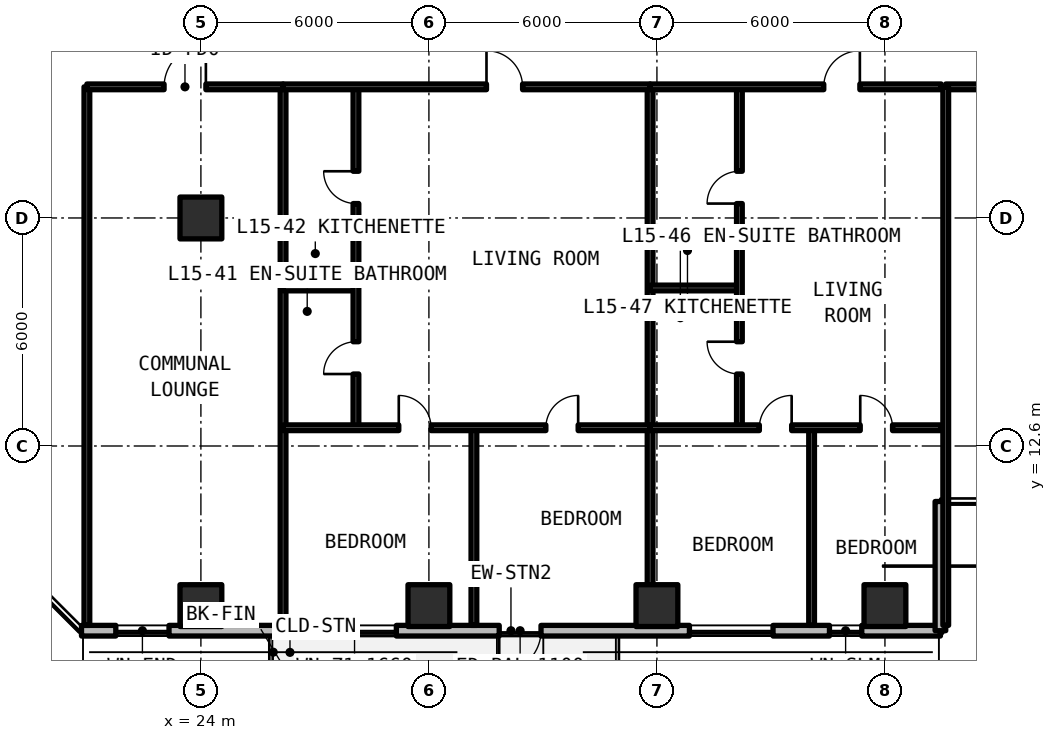
"""IFC4 building model, lengths in metres.
Left out: names, types, materials, properties, quantities, classifications, styles, units other than length and angle.
Written with IfcOpenShell. Run it as: python <this file> out.ifc"""

import sys

from ifc_helpers import new_model, si_unit, direction, frame, frame_2d, origin, origin_2d, place, context, subcontext, project, spatial, rectangle, extrude, element, fill, save


model = new_model("IFC4")
c1 = context("Model", 3, precision=1e-05, world=origin(), true_north=direction((0.0, 1.0)))
c2 = subcontext(c1, "Body", "Model", "MODEL_VIEW")
j1 = project(units=[si_unit("LENGTHUNIT", "METRE"), si_unit("PLANEANGLEUNIT", "RADIAN")], contexts=[c1])
p1 = place(None, origin())
s1 = spatial("IfcSite", under=j1, at=p1, CompositionType="ELEMENT")
p2 = place(p1, origin())
s2 = spatial("IfcBuilding", under=s1, at=p2, CompositionType="ELEMENT")
p3 = place(p2, frame((0.0, 0.0, 55.44)))
s3 = spatial("IfcBuildingStorey", under=s2, at=p3, CompositionType="ELEMENT", Elevation=55.44)
for number, where, z_axis, x_axis in (
    (1, (24.0, 18.6, 0.0), (0.0, 0.0, 1.0), (1.0, 0.0, 0.0)),
    (2, (24.0, 8.4, 0.0), (0.0, 0.0, 1.0), (1.0, 0.0, 0.0)),
    (3, (30.0, 8.4, 0.0), (0.0, 0.0, 1.0), (1.0, 0.0, 0.0)),
    (4, (36.0, 8.4, 0.0), (0.0, 0.0, 1.0), (1.0, 0.0, 0.0)),
    (5, (42.0, 8.4, 0.0), (0.0, 0.0, 1.0), (1.0, 0.0, 0.0)),
):
    element("IfcColumn", number, at=place(p3, frame(where, z_axis=z_axis, x_axis=x_axis)), inside=s3, PredefinedType="COLUMN", context=c2, shape_type="SweptSolid", body=[
        extrude(rectangle(XDim=1.1, YDim=1.1, at=origin_2d()), origin(), (0.0, 0.0, 1.0), 3.3),
    ])
p4 = place(p3, frame((20.858, 7.74, 0.0), z_axis=(0.0, 0.0, 1.0), x_axis=(1.0, 0.0, 0.0)))
e6 = element("IfcWall", 6, at=p4, inside=s3, PredefinedType="SOLIDWALL", context=c2, shape_type="SweptSolid", body=[
    extrude(rectangle(XDim=22.602, YDim=0.28, at=frame_2d((11.301, 0.0))), origin(), (0.0, 0.0, 1.0), 3.08),
])
p5 = place(p4, frame((10.992, 0.0, 0.0)))
e7 = element("IfcOpeningElement", 7, at=p5, cuts=e6, PredefinedType="OPENING", context=c2, shape_type="SweptSolid", body=[
    extrude(rectangle(XDim=1.1, YDim=2.15, at=frame_2d((0.55, 1.075))), frame((0.0, 0.15, 0.0), z_axis=(0.0, -1.0, 0.0), x_axis=(1.0, 0.0, 0.0)), (0.0, 0.0, 1.0), 0.3),
])
p6 = place(p4, frame((0.903, 0.0, 0.78)))
e8 = element("IfcOpeningElement", 8, at=p6, cuts=e6, PredefinedType="OPENING", context=c2, shape_type="SweptSolid", body=[
    extrude(rectangle(XDim=1.4, YDim=1.65, at=frame_2d((0.7, 0.825))), frame((0.0, 0.15, 0.0), z_axis=(0.0, -1.0, 0.0), x_axis=(1.0, 0.0, 0.0)), (0.0, 0.0, 1.0), 0.3),
])
p7 = place(p4, frame((6.085, 0.0, 0.78)))
e9 = element("IfcOpeningElement", 9, at=p7, cuts=e6, PredefinedType="OPENING", context=c2, shape_type="SweptSolid", body=[
    extrude(rectangle(XDim=2.2, YDim=1.66, at=frame_2d((1.1, 0.83))), frame((0.0, 0.15, 0.0), z_axis=(0.0, -1.0, 0.0), x_axis=(1.0, 0.0, 0.0)), (0.0, 0.0, 1.0), 0.3),
])
p8 = place(p4, frame((15.997, 0.0, 0.78)))
e10 = element("IfcOpeningElement", 10, at=p8, cuts=e6, PredefinedType="OPENING", context=c2, shape_type="SweptSolid", body=[
    extrude(rectangle(XDim=2.2, YDim=1.66, at=frame_2d((1.1, 0.83))), frame((0.0, 0.15, 0.0), z_axis=(0.0, -1.0, 0.0), x_axis=(1.0, 0.0, 0.0)), (0.0, 0.0, 1.0), 0.3),
])
p9 = place(p4, frame((19.682, 0.0, 0.78)))
e11 = element("IfcOpeningElement", 11, at=p9, cuts=e6, PredefinedType="OPENING", context=c2, shape_type="SweptSolid", body=[
    extrude(rectangle(XDim=0.85, YDim=1.65, at=frame_2d((0.425, 0.825))), frame((0.0, 0.15, 0.0), z_axis=(0.0, -1.0, 0.0), x_axis=(1.0, 0.0, 0.0)), (0.0, 0.0, 1.0), 0.3),
])
p10 = place(p3, frame((43.46, 7.74, 0.0), z_axis=(0.0, 0.0, 1.0), x_axis=(0.0, 1.0, 0.0)))
e12 = element("IfcWall", 12, at=p10, inside=s3, PredefinedType="SOLIDWALL", context=c2, shape_type="SweptSolid", body=[
    extrude(rectangle(XDim=3.4, YDim=0.28, at=frame_2d((1.7, 0.0))), origin(), (0.0, 0.0, 1.0), 3.08),
])
p11 = place(p3, frame((43.6, 22.05, 0.0), z_axis=(0.0, 0.0, 1.0), x_axis=(1.0, 0.0, 0.0)))
e13 = element("IfcWall", 13, at=p11, inside=s3, PredefinedType="SOLIDWALL", context=c2, shape_type="SweptSolid", body=[
    extrude(rectangle(XDim=8.4, YDim=0.15, at=frame_2d((4.2, 0.0))), origin(), (0.0, 0.0, 1.0), 2.35),
])
p12 = place(p11, frame((3.65, 0.0, 0.0)))
e14 = element("IfcOpeningElement", 14, at=p12, cuts=e13, PredefinedType="OPENING", context=c2, shape_type="SweptSolid", body=[
    extrude(rectangle(XDim=1.1, YDim=2.15, at=frame_2d((0.55, 1.075))), frame((0.0, 0.085, 0.0), z_axis=(0.0, -1.0, 0.0), x_axis=(1.0, 0.0, 0.0)), (0.0, 0.0, 1.0), 0.17),
])
for number, where, z_axis, x_axis in (
    (15, (43.6, 7.88, 0.0), (0.0, 0.0, 1.0), (0.0, 1.0, 0.0)),
    (16, (21.0, 7.88, 0.0), (0.0, 0.0, 1.0), (0.0, 1.0, 0.0)),
    (17, (26.162, 7.88, 0.0), (0.0, 0.0, 1.0), (0.0, 1.0, 0.0)),
):
    element("IfcWall", number, at=place(p3, frame(where, z_axis=z_axis, x_axis=x_axis)), inside=s3, PredefinedType="SOLIDWALL", context=c2, shape_type="SweptSolid", body=[
        extrude(rectangle(XDim=14.17, YDim=0.15, at=frame_2d((7.085, 0.0))), origin(), (0.0, 0.0, 1.0), 2.35),
    ])
p13 = place(p3, frame((21.0, 22.05, 0.0), z_axis=(0.0, 0.0, 1.0), x_axis=(1.0, 0.0, 0.0)))
e18 = element("IfcWall", 18, at=p13, inside=s3, PredefinedType="SOLIDWALL", context=c2, shape_type="SweptSolid", body=[
    extrude(rectangle(XDim=5.162, YDim=0.15, at=frame_2d((2.581, 0.0))), origin(), (0.0, 0.0, 1.0), 2.35),
])
p14 = place(p13, frame((2.031, 0.0, 0.0)))
e19 = element("IfcOpeningElement", 19, at=p14, cuts=e18, PredefinedType="OPENING", context=c2, shape_type="SweptSolid", body=[
    extrude(rectangle(XDim=1.1, YDim=2.15, at=frame_2d((0.55, 1.075))), frame((0.0, 0.085, 0.0), z_axis=(0.0, -1.0, 0.0), x_axis=(1.0, 0.0, 0.0)), (0.0, 0.0, 1.0), 0.17),
])
p15 = place(p3, frame((35.82, 7.88, 0.0), z_axis=(0.0, 0.0, 1.0), x_axis=(0.0, 1.0, 0.0)))
e20 = element("IfcWall", 20, at=p15, inside=s3, PredefinedType="SOLIDWALL", context=c2, shape_type="SweptSolid", body=[
    extrude(rectangle(XDim=14.17, YDim=0.15, at=frame_2d((7.085, 0.0))), origin(), (0.0, 0.0, 1.0), 2.35),
])
p16 = place(p3, frame((26.162, 16.758, 0.0), z_axis=(0.0, 0.0, 1.0), x_axis=(1.0, 0.0, 0.0)))
e21 = element("IfcWall", 21, at=p16, inside=s3, PredefinedType="PARTITIONING", context=c2, shape_type="SweptSolid", body=[
    extrude(rectangle(XDim=1.918, YDim=0.15, at=frame_2d((0.959, 0.0))), origin(), (0.0, 0.0, 1.0), 2.35),
])
p17 = place(p3, frame((28.08, 13.08, 0.0), z_axis=(0.0, 0.0, 1.0), x_axis=(0.0, 1.0, 0.0)))
e22 = element("IfcWall", 22, at=p17, inside=s3, PredefinedType="PARTITIONING", context=c2, shape_type="SweptSolid", body=[
    extrude(rectangle(XDim=8.97, YDim=0.15, at=frame_2d((4.485, 0.0))), origin(), (0.0, 0.0, 1.0), 2.35),
])
p18 = place(p17, frame((1.414, 0.0, 0.0)))
e23 = element("IfcOpeningElement", 23, at=p18, cuts=e22, PredefinedType="OPENING", context=c2, shape_type="SweptSolid", body=[
    extrude(rectangle(XDim=0.85, YDim=2.1, at=frame_2d((0.425, 1.05))), frame((0.0, 0.085, 0.0), z_axis=(0.0, -1.0, 0.0), x_axis=(1.0, 0.0, 0.0)), (0.0, 0.0, 1.0), 0.17),
])
p19 = place(p17, frame((5.899, 0.0, 0.0)))
e24 = element("IfcOpeningElement", 24, at=p19, cuts=e22, PredefinedType="OPENING", context=c2, shape_type="SweptSolid", body=[
    extrude(rectangle(XDim=0.85, YDim=2.1, at=frame_2d((0.425, 1.05))), frame((0.0, 0.085, 0.0), z_axis=(0.0, -1.0, 0.0), x_axis=(1.0, 0.0, 0.0)), (0.0, 0.0, 1.0), 0.17),
])
p20 = place(p3, frame((31.184, 7.88, 0.0), z_axis=(0.0, 0.0, 1.0), x_axis=(0.0, 1.0, 0.0)))
e25 = element("IfcWall", 25, at=p20, inside=s3, PredefinedType="PARTITIONING", context=c2, shape_type="SweptSolid", body=[
    extrude(rectangle(XDim=5.2, YDim=0.15, at=frame_2d((2.6, 0.0))), origin(), (0.0, 0.0, 1.0), 2.35),
])
p21 = place(p3, frame((26.162, 13.08, 0.0), z_axis=(0.0, 0.0, 1.0), x_axis=(1.0, 0.0, 0.0)))
e26 = element("IfcWall", 26, at=p21, inside=s3, PredefinedType="PARTITIONING", context=c2, shape_type="SweptSolid", body=[
    extrude(rectangle(XDim=9.658, YDim=0.15, at=frame_2d((4.829, 0.0))), origin(), (0.0, 0.0, 1.0), 2.35),
])
p22 = place(p21, frame((3.045, 0.0, 0.0)))
e27 = element("IfcOpeningElement", 27, at=p22, cuts=e26, PredefinedType="OPENING", context=c2, shape_type="SweptSolid", body=[
    extrude(rectangle(XDim=0.85, YDim=2.1, at=frame_2d((0.425, 1.05))), frame((0.0, 0.085, 0.0), z_axis=(0.0, -1.0, 0.0), x_axis=(1.0, 0.0, 0.0)), (0.0, 0.0, 1.0), 0.17),
])
p23 = place(p21, frame((6.915, 0.0, 0.0)))
e28 = element("IfcOpeningElement", 28, at=p23, cuts=e26, PredefinedType="OPENING", context=c2, shape_type="SweptSolid", body=[
    extrude(rectangle(XDim=0.85, YDim=2.1, at=frame_2d((0.425, 1.05))), frame((0.0, 0.085, 0.0), z_axis=(0.0, -1.0, 0.0), x_axis=(1.0, 0.0, 0.0)), (0.0, 0.0, 1.0), 0.17),
])
p24 = place(p3, frame((26.162, 22.05, 0.0), z_axis=(0.0, 0.0, 1.0), x_axis=(1.0, 0.0, 0.0)))
e29 = element("IfcWall", 29, at=p24, inside=s3, PredefinedType="SOLIDWALL", context=c2, shape_type="SweptSolid", body=[
    extrude(rectangle(XDim=9.658, YDim=0.15, at=frame_2d((4.829, 0.0))), origin(), (0.0, 0.0, 1.0), 2.35),
])
p25 = place(p24, frame((5.353, 0.0, 0.0)))
e30 = element("IfcOpeningElement", 30, at=p25, cuts=e29, PredefinedType="OPENING", context=c2, shape_type="SweptSolid", body=[
    extrude(rectangle(XDim=0.95, YDim=2.15, at=frame_2d((0.475, 1.075))), frame((0.0, 0.085, 0.0), z_axis=(0.0, -1.0, 0.0), x_axis=(1.0, 0.0, 0.0)), (0.0, 0.0, 1.0), 0.17),
])
p26 = place(p3, frame((35.82, 16.758, 0.0), z_axis=(0.0, 0.0, 1.0), x_axis=(1.0, 0.0, 0.0)))
e31 = element("IfcWall", 31, at=p26, inside=s3, PredefinedType="PARTITIONING", context=c2, shape_type="SweptSolid", body=[
    extrude(rectangle(XDim=2.35, YDim=0.15, at=frame_2d((1.175, 0.0))), origin(), (0.0, 0.0, 1.0), 2.35),
])
p27 = place(p3, frame((38.17, 13.08, 0.0), z_axis=(0.0, 0.0, 1.0), x_axis=(0.0, 1.0, 0.0)))
e32 = element("IfcWall", 32, at=p27, inside=s3, PredefinedType="PARTITIONING", context=c2, shape_type="SweptSolid", body=[
    extrude(rectangle(XDim=8.97, YDim=0.15, at=frame_2d((4.485, 0.0))), origin(), (0.0, 0.0, 1.0), 2.35),
])
p28 = place(p27, frame((1.414, 0.0, 0.0)))
e33 = element("IfcOpeningElement", 33, at=p28, cuts=e32, PredefinedType="OPENING", context=c2, shape_type="SweptSolid", body=[
    extrude(rectangle(XDim=0.85, YDim=2.1, at=frame_2d((0.425, 1.05))), frame((0.0, 0.085, 0.0), z_axis=(0.0, -1.0, 0.0), x_axis=(1.0, 0.0, 0.0)), (0.0, 0.0, 1.0), 0.17),
])
p29 = place(p27, frame((5.899, 0.0, 0.0)))
e34 = element("IfcOpeningElement", 34, at=p29, cuts=e32, PredefinedType="OPENING", context=c2, shape_type="SweptSolid", body=[
    extrude(rectangle(XDim=0.85, YDim=2.1, at=frame_2d((0.425, 1.05))), frame((0.0, 0.085, 0.0), z_axis=(0.0, -1.0, 0.0), x_axis=(1.0, 0.0, 0.0)), (0.0, 0.0, 1.0), 0.17),
])
p30 = place(p3, frame((40.07, 7.88, 0.0), z_axis=(0.0, 0.0, 1.0), x_axis=(0.0, 1.0, 0.0)))
e35 = element("IfcWall", 35, at=p30, inside=s3, PredefinedType="PARTITIONING", context=c2, shape_type="SweptSolid", body=[
    extrude(rectangle(XDim=5.2, YDim=0.15, at=frame_2d((2.6, 0.0))), origin(), (0.0, 0.0, 1.0), 2.35),
])
p31 = place(p3, frame((35.82, 13.08, 0.0), z_axis=(0.0, 0.0, 1.0), x_axis=(1.0, 0.0, 0.0)))
e36 = element("IfcWall", 36, at=p31, inside=s3, PredefinedType="PARTITIONING", context=c2, shape_type="SweptSolid", body=[
    extrude(rectangle(XDim=7.66, YDim=0.15, at=frame_2d((3.83, 0.0))), origin(), (0.0, 0.0, 1.0), 2.35),
])
p32 = place(p31, frame((2.875, 0.0, 0.0)))
e37 = element("IfcOpeningElement", 37, at=p32, cuts=e36, PredefinedType="OPENING", context=c2, shape_type="SweptSolid", body=[
    extrude(rectangle(XDim=0.85, YDim=2.1, at=frame_2d((0.425, 1.05))), frame((0.0, 0.085, 0.0), z_axis=(0.0, -1.0, 0.0), x_axis=(1.0, 0.0, 0.0)), (0.0, 0.0, 1.0), 0.17),
])
p33 = place(p31, frame((5.53, 0.0, 0.0)))
e38 = element("IfcOpeningElement", 38, at=p33, cuts=e36, PredefinedType="OPENING", context=c2, shape_type="SweptSolid", body=[
    extrude(rectangle(XDim=0.85, YDim=2.1, at=frame_2d((0.425, 1.05))), frame((0.0, 0.085, 0.0), z_axis=(0.0, -1.0, 0.0), x_axis=(1.0, 0.0, 0.0)), (0.0, 0.0, 1.0), 0.17),
])
p34 = place(p3, frame((35.82, 22.05, 0.0), z_axis=(0.0, 0.0, 1.0), x_axis=(1.0, 0.0, 0.0)))
e39 = element("IfcWall", 39, at=p34, inside=s3, PredefinedType="SOLIDWALL", context=c2, shape_type="SweptSolid", body=[
    extrude(rectangle(XDim=7.66, YDim=0.15, at=frame_2d((3.83, 0.0))), origin(), (0.0, 0.0, 1.0), 2.35),
])
p35 = place(p34, frame((4.57, 0.0, 0.0)))
e40 = element("IfcOpeningElement", 40, at=p35, cuts=e39, PredefinedType="OPENING", context=c2, shape_type="SweptSolid", body=[
    extrude(rectangle(XDim=0.95, YDim=2.15, at=frame_2d((0.475, 1.075))), frame((0.0, 0.085, 0.0), z_axis=(0.0, -1.0, 0.0), x_axis=(1.0, 0.0, 0.0)), (0.0, 0.0, 1.0), 0.17),
])
p36 = place(p5, frame((1.1, 0.0, 0.0), z_axis=(0.0, 0.0, 1.0), x_axis=(-1.0, 0.0, 0.0)))
e41 = element("IfcDoor", 41, at=p36, inside=s3, OperationType="SINGLE_SWING_RIGHT", PredefinedType="DOOR", context=c2, shape_type="SweptSolid", body=[
    extrude(rectangle(XDim=1.1, YDim=2.15, at=frame_2d((0.55, 1.075))), frame((0.0, 0.025, 0.0), z_axis=(0.0, -1.0, 0.0), x_axis=(1.0, 0.0, 0.0)), (0.0, 0.0, 1.0), 0.05),
])
fill(e7, e41)
p37 = place(p6, origin())
e42 = element("IfcWindow", 42, at=p37, inside=s3, PartitioningType="SINGLE_PANEL", PredefinedType="WINDOW", context=c2, shape_type="SweptSolid", body=[
    extrude(rectangle(XDim=1.4, YDim=1.65, at=frame_2d((0.7, 0.825))), frame((0.0, 0.03, 0.0), z_axis=(0.0, -1.0, 0.0), x_axis=(1.0, 0.0, 0.0)), (0.0, 0.0, 1.0), 0.06),
])
fill(e8, e42)
p38 = place(p7, origin())
e43 = element("IfcWindow", 43, at=p38, inside=s3, PartitioningType="SINGLE_PANEL", PredefinedType="WINDOW", context=c2, shape_type="SweptSolid", body=[
    extrude(rectangle(XDim=2.2, YDim=1.66, at=frame_2d((1.1, 0.83))), frame((0.0, 0.03, 0.0), z_axis=(0.0, -1.0, 0.0), x_axis=(1.0, 0.0, 0.0)), (0.0, 0.0, 1.0), 0.06),
])
fill(e9, e43)
p39 = place(p8, origin())
e44 = element("IfcWindow", 44, at=p39, inside=s3, PartitioningType="SINGLE_PANEL", PredefinedType="WINDOW", context=c2, shape_type="SweptSolid", body=[
    extrude(rectangle(XDim=2.2, YDim=1.66, at=frame_2d((1.1, 0.83))), frame((0.0, 0.03, 0.0), z_axis=(0.0, -1.0, 0.0), x_axis=(1.0, 0.0, 0.0)), (0.0, 0.0, 1.0), 0.06),
])
fill(e10, e44)
p40 = place(p9, origin())
e45 = element("IfcWindow", 45, at=p40, inside=s3, PartitioningType="SINGLE_PANEL", PredefinedType="WINDOW", context=c2, shape_type="SweptSolid", body=[
    extrude(rectangle(XDim=0.85, YDim=1.65, at=frame_2d((0.425, 0.825))), frame((0.0, 0.03, 0.0), z_axis=(0.0, -1.0, 0.0), x_axis=(1.0, 0.0, 0.0)), (0.0, 0.0, 1.0), 0.06),
])
fill(e11, e45)
p41 = place(p14, origin())
e46 = element("IfcDoor", 46, at=p41, inside=s3, OperationType="SINGLE_SWING_RIGHT", PredefinedType="DOOR", context=c2, shape_type="SweptSolid", body=[
    extrude(rectangle(XDim=1.1, YDim=2.15, at=frame_2d((0.55, 1.075))), frame((0.0, 0.025, 0.0), z_axis=(0.0, -1.0, 0.0), x_axis=(1.0, 0.0, 0.0)), (0.0, 0.0, 1.0), 0.05),
])
fill(e19, e46)
p42 = place(p18, origin())
e47 = element("IfcDoor", 47, at=p42, inside=s3, OperationType="SINGLE_SWING_LEFT", PredefinedType="DOOR", context=c2, shape_type="SweptSolid", body=[
    extrude(rectangle(XDim=0.85, YDim=2.1, at=frame_2d((0.425, 1.05))), frame((0.0, 0.025, 0.0), z_axis=(0.0, -1.0, 0.0), x_axis=(1.0, 0.0, 0.0)), (0.0, 0.0, 1.0), 0.05),
])
fill(e23, e47)
p43 = place(p19, origin())
e48 = element("IfcDoor", 48, at=p43, inside=s3, OperationType="SINGLE_SWING_RIGHT", PredefinedType="DOOR", context=c2, shape_type="SweptSolid", body=[
    extrude(rectangle(XDim=0.85, YDim=2.1, at=frame_2d((0.425, 1.05))), frame((0.0, 0.025, 0.0), z_axis=(0.0, -1.0, 0.0), x_axis=(1.0, 0.0, 0.0)), (0.0, 0.0, 1.0), 0.05),
])
fill(e24, e48)
p44 = place(p22, origin())
e49 = element("IfcDoor", 49, at=p44, inside=s3, OperationType="SINGLE_SWING_LEFT", PredefinedType="DOOR", context=c2, shape_type="SweptSolid", body=[
    extrude(rectangle(XDim=0.85, YDim=2.1, at=frame_2d((0.425, 1.05))), frame((0.0, 0.025, 0.0), z_axis=(0.0, -1.0, 0.0), x_axis=(1.0, 0.0, 0.0)), (0.0, 0.0, 1.0), 0.05),
])
fill(e27, e49)
p45 = place(p23, origin())
e50 = element("IfcDoor", 50, at=p45, inside=s3, OperationType="SINGLE_SWING_RIGHT", PredefinedType="DOOR", context=c2, shape_type="SweptSolid", body=[
    extrude(rectangle(XDim=0.85, YDim=2.1, at=frame_2d((0.425, 1.05))), frame((0.0, 0.025, 0.0), z_axis=(0.0, -1.0, 0.0), x_axis=(1.0, 0.0, 0.0)), (0.0, 0.0, 1.0), 0.05),
])
fill(e28, e50)
p46 = place(p25, origin())
e51 = element("IfcDoor", 51, at=p46, inside=s3, OperationType="SINGLE_SWING_LEFT", PredefinedType="DOOR", context=c2, shape_type="SweptSolid", body=[
    extrude(rectangle(XDim=0.95, YDim=2.15, at=frame_2d((0.475, 1.075))), frame((0.0, 0.025, 0.0), z_axis=(0.0, -1.0, 0.0), x_axis=(1.0, 0.0, 0.0)), (0.0, 0.0, 1.0), 0.05),
])
fill(e30, e51)
p47 = place(p28, origin())
e52 = element("IfcDoor", 52, at=p47, inside=s3, OperationType="SINGLE_SWING_RIGHT", PredefinedType="DOOR", context=c2, shape_type="SweptSolid", body=[
    extrude(rectangle(XDim=0.85, YDim=2.1, at=frame_2d((0.425, 1.05))), frame((0.0, 0.025, 0.0), z_axis=(0.0, -1.0, 0.0), x_axis=(1.0, 0.0, 0.0)), (0.0, 0.0, 1.0), 0.05),
])
fill(e33, e52)
p48 = place(p29, origin())
e53 = element("IfcDoor", 53, at=p48, inside=s3, OperationType="SINGLE_SWING_LEFT", PredefinedType="DOOR", context=c2, shape_type="SweptSolid", body=[
    extrude(rectangle(XDim=0.85, YDim=2.1, at=frame_2d((0.425, 1.05))), frame((0.0, 0.025, 0.0), z_axis=(0.0, -1.0, 0.0), x_axis=(1.0, 0.0, 0.0)), (0.0, 0.0, 1.0), 0.05),
])
fill(e34, e53)
p49 = place(p32, origin())
e54 = element("IfcDoor", 54, at=p49, inside=s3, OperationType="SINGLE_SWING_RIGHT", PredefinedType="DOOR", context=c2, shape_type="SweptSolid", body=[
    extrude(rectangle(XDim=0.85, YDim=2.1, at=frame_2d((0.425, 1.05))), frame((0.0, 0.025, 0.0), z_axis=(0.0, -1.0, 0.0), x_axis=(1.0, 0.0, 0.0)), (0.0, 0.0, 1.0), 0.05),
])
fill(e37, e54)
p50 = place(p33, origin())
e55 = element("IfcDoor", 55, at=p50, inside=s3, OperationType="SINGLE_SWING_LEFT", PredefinedType="DOOR", context=c2, shape_type="SweptSolid", body=[
    extrude(rectangle(XDim=0.85, YDim=2.1, at=frame_2d((0.425, 1.05))), frame((0.0, 0.025, 0.0), z_axis=(0.0, -1.0, 0.0), x_axis=(1.0, 0.0, 0.0)), (0.0, 0.0, 1.0), 0.05),
])
fill(e38, e55)
p51 = place(p35, origin())
e56 = element("IfcDoor", 56, at=p51, inside=s3, OperationType="SINGLE_SWING_RIGHT", PredefinedType="DOOR", context=c2, shape_type="SweptSolid", body=[
    extrude(rectangle(XDim=0.95, YDim=2.15, at=frame_2d((0.475, 1.075))), frame((0.0, 0.025, 0.0), z_axis=(0.0, -1.0, 0.0), x_axis=(1.0, 0.0, 0.0)), (0.0, 0.0, 1.0), 0.05),
])
fill(e40, e56)
save(model, sys.argv[1])
